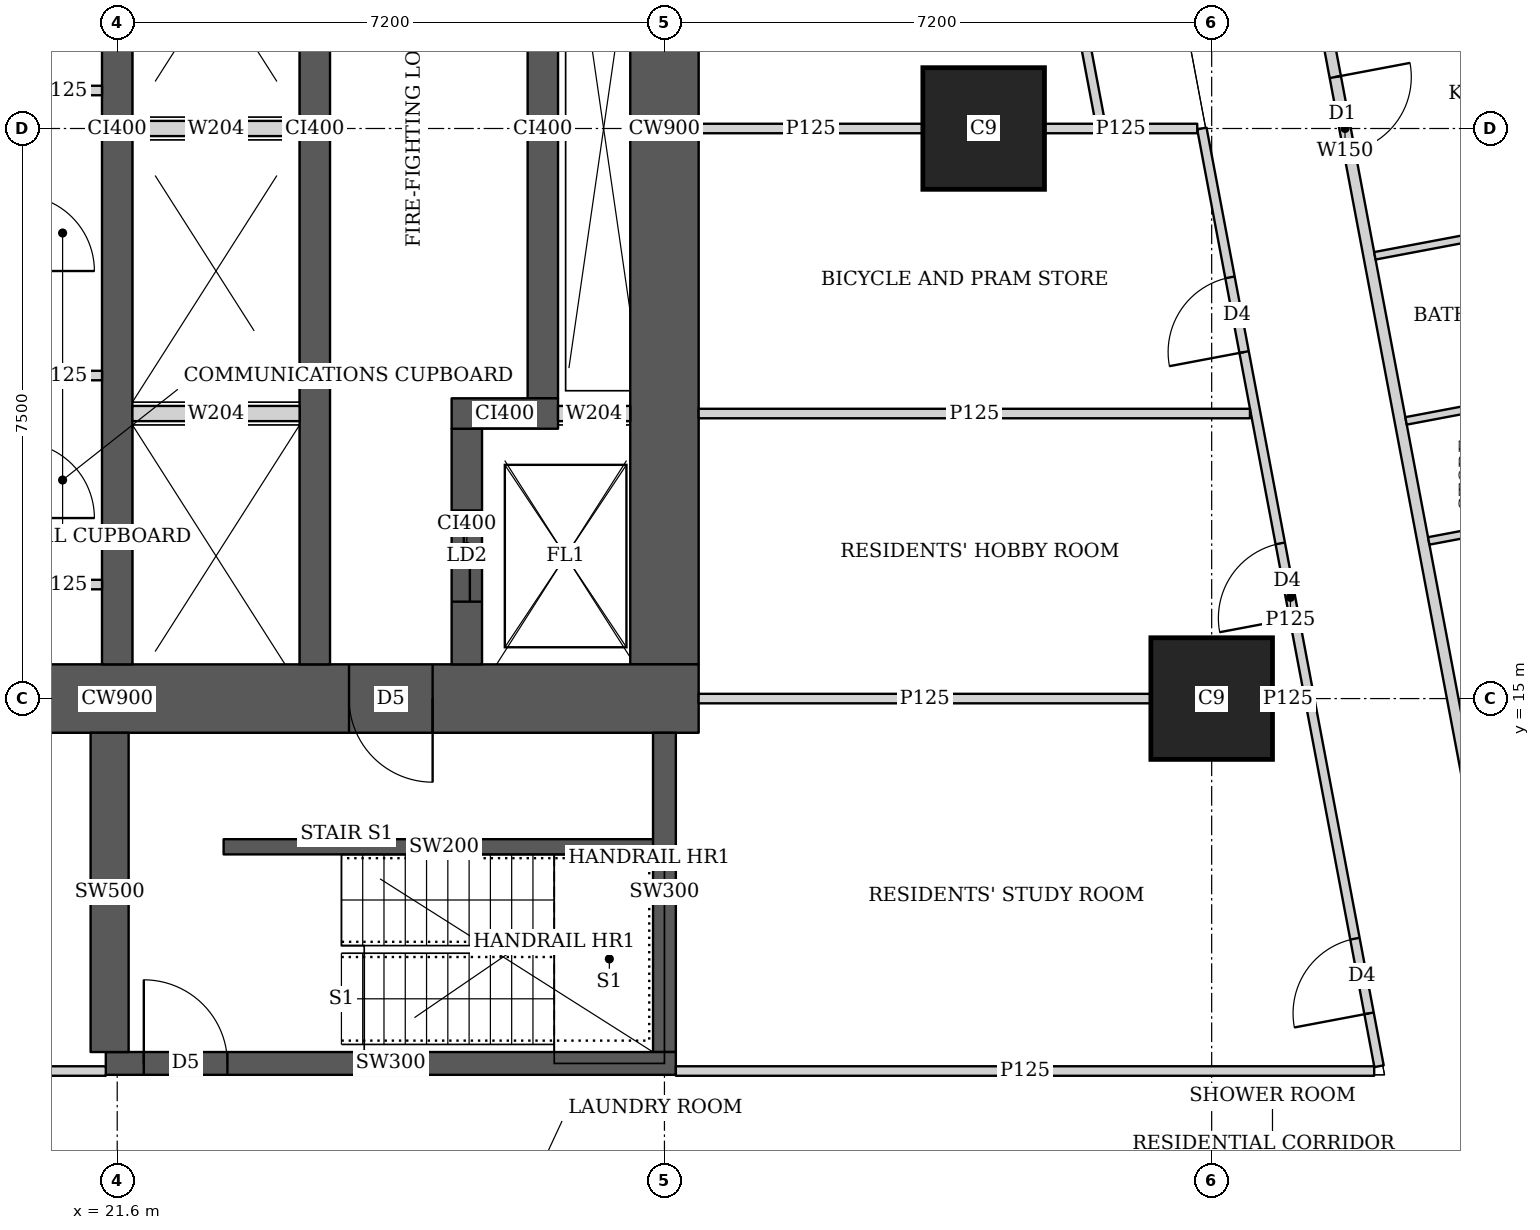
"""IFC4 building model, lengths in metres.
Left out: names, types, materials, properties, quantities, classifications, styles, units other than length and angle.
Written with IfcOpenShell. Run it as: python <this file> out.ifc"""

import sys

from ifc_helpers import new_model, si_unit, direction, frame, frame_2d, origin, origin_2d, place, context, subcontext, project, spatial, rectangle, extrude, element, fill, save


model = new_model("IFC4")
c1 = context("Model", 3, precision=1e-05, world=origin(), true_north=direction((0.0, 1.0)))
c2 = subcontext(c1, "Body", "Model", "MODEL_VIEW")
j1 = project(units=[si_unit("LENGTHUNIT", "METRE"), si_unit("PLANEANGLEUNIT", "RADIAN")], contexts=[c1])
p1 = place(None, origin())
s1 = spatial("IfcSite", under=j1, at=p1, CompositionType="ELEMENT")
p2 = place(p1, origin())
s2 = spatial("IfcBuilding", under=s1, at=p2, CompositionType="ELEMENT")
p3 = place(p2, frame((0.0, 0.0, 81.65)))
s3 = spatial("IfcBuildingStorey", under=s2, at=p3, CompositionType="ELEMENT", Elevation=81.65)
for number, where, z_axis, x_axis in (
    (1, (36.0, 15.0, 0.0), (0.0, 0.0, 1.0), (1.0, 0.0, 0.0)),
    (2, (33.0, 22.5, 0.0), (0.0, 0.0, 1.0), (1.0, 0.0, 0.0)),
):
    element("IfcColumn", number, at=place(p3, frame(where, z_axis=z_axis, x_axis=x_axis)), inside=s3, PredefinedType="COLUMN", context=c2, shape_type="SweptSolid", body=[
        extrude(rectangle(XDim=1.6, YDim=1.6, at=origin_2d()), origin(), (0.0, 0.0, 1.0), 3.75),
    ])
p4 = place(p3, frame((13.95, 15.0, 0.0), z_axis=(0.0, 0.0, 1.0), x_axis=(1.0, 0.0, 0.0)))
e3 = element("IfcWall", 3, at=p4, inside=s3, PredefinedType="SHEAR", context=c2, shape_type="SweptSolid", body=[
    extrude(rectangle(XDim=15.3, YDim=0.9, at=frame_2d((7.65, 0.0))), origin(), (0.0, 0.0, 1.0), 3.75),
])
p5 = place(p4, frame((4.45, 0.0, 0.0)))
e4 = element("IfcOpeningElement", 4, at=p5, cuts=e3, PredefinedType="OPENING", context=c2, shape_type="SweptSolid", body=[
    extrude(rectangle(XDim=1.8, YDim=2.1, at=frame_2d((0.9, 1.05))), frame((0.0, 0.46, 0.0), z_axis=(0.0, -1.0, 0.0), x_axis=(1.0, 0.0, 0.0)), (0.0, 0.0, 1.0), 0.92),
])
p6 = place(p4, frame((10.7, 0.0, 0.0)))
e5 = element("IfcOpeningElement", 5, at=p6, cuts=e3, PredefinedType="OPENING", context=c2, shape_type="SweptSolid", body=[
    extrude(rectangle(XDim=1.1, YDim=2.1, at=frame_2d((0.55, 1.05))), frame((0.0, 0.46, 0.0), z_axis=(0.0, -1.0, 0.0), x_axis=(1.0, 0.0, 0.0)), (0.0, 0.0, 1.0), 0.92),
])
p7 = place(p3, frame((28.8, 15.45, 0.0), z_axis=(0.0, 0.0, 1.0), x_axis=(0.0, 1.0, 0.0)))
e6 = element("IfcWall", 6, at=p7, inside=s3, PredefinedType="SHEAR", context=c2, shape_type="SweptSolid", body=[
    extrude(rectangle(XDim=14.1, YDim=0.9, at=frame_2d((7.05, 0.0))), origin(), (0.0, 0.0, 1.0), 3.75),
])
for number, where, z_axis, x_axis in (
    (7, (21.6, 15.45, 0.0), (0.0, 0.0, 1.0), (0.0, 1.0, 0.0)),
    (8, (24.2, 15.45, 0.0), (0.0, 0.0, 1.0), (0.0, 1.0, 0.0)),
):
    element("IfcWall", number, at=place(p3, frame(where, z_axis=z_axis, x_axis=x_axis)), inside=s3, PredefinedType="SHEAR", context=c2, shape_type="SweptSolid", body=[
        extrude(rectangle(XDim=14.1, YDim=0.4, at=frame_2d((7.05, 0.0))), origin(), (0.0, 0.0, 1.0), 3.75),
    ])
p8 = place(p3, frame((26.2, 15.45, 0.0), z_axis=(0.0, 0.0, 1.0), x_axis=(0.0, 1.0, 0.0)))
e9 = element("IfcWall", 9, at=p8, inside=s3, PredefinedType="SHEAR", context=c2, shape_type="SweptSolid", body=[
    extrude(rectangle(XDim=3.1, YDim=0.4, at=frame_2d((1.55, 0.0))), origin(), (0.0, 0.0, 1.0), 3.75),
])
p9 = place(p8, frame((0.825, 0.0, 0.0)))
e10 = element("IfcOpeningElement", 10, at=p9, cuts=e9, PredefinedType="OPENING", context=c2, shape_type="SweptSolid", body=[
    extrude(rectangle(XDim=1.2, YDim=2.1, at=frame_2d((0.6, 1.05))), frame((0.0, 0.21, 0.0), z_axis=(0.0, -1.0, 0.0), x_axis=(1.0, 0.0, 0.0)), (0.0, 0.0, 1.0), 0.42),
])
p10 = place(p3, frame((26.0, 18.75, 0.0), z_axis=(0.0, 0.0, 1.0), x_axis=(1.0, 0.0, 0.0)))
e11 = element("IfcWall", 11, at=p10, inside=s3, PredefinedType="SHEAR", context=c2, shape_type="SweptSolid", body=[
    extrude(rectangle(XDim=1.4, YDim=0.4, at=frame_2d((0.7, 0.0))), origin(), (0.0, 0.0, 1.0), 3.75),
])
p11 = place(p3, frame((27.2, 18.95, 0.0), z_axis=(0.0, 0.0, 1.0), x_axis=(0.0, 1.0, 0.0)))
e12 = element("IfcWall", 12, at=p11, inside=s3, PredefinedType="SHEAR", context=c2, shape_type="SweptSolid", body=[
    extrude(rectangle(XDim=7.1, YDim=0.4, at=frame_2d((3.55, 0.0))), origin(), (0.0, 0.0, 1.0), 3.75),
])
p12 = place(p3, frame((21.45, 10.2, 0.0), z_axis=(0.0, 0.0, 1.0), x_axis=(1.0, 0.0, 0.0)))
e13 = element("IfcWall", 13, at=p12, inside=s3, PredefinedType="SHEAR", context=c2, shape_type="SweptSolid", body=[
    extrude(rectangle(XDim=7.5, YDim=0.3, at=frame_2d((3.75, 0.0))), origin(), (0.0, 0.0, 1.0), 3.75),
])
p13 = place(p12, frame((0.5, 0.0, 0.0)))
e14 = element("IfcOpeningElement", 14, at=p13, cuts=e13, PredefinedType="OPENING", context=c2, shape_type="SweptSolid", body=[
    extrude(rectangle(XDim=1.1, YDim=2.1, at=frame_2d((0.55, 1.05))), frame((0.0, 0.16, 0.0), z_axis=(0.0, -1.0, 0.0), x_axis=(1.0, 0.0, 0.0)), (0.0, 0.0, 1.0), 0.32),
])
p14 = place(p3, frame((21.5, 10.35, 0.0), z_axis=(0.0, 0.0, 1.0), x_axis=(0.0, 1.0, 0.0)))
e15 = element("IfcWall", 15, at=p14, inside=s3, PredefinedType="SHEAR", context=c2, shape_type="SweptSolid", body=[
    extrude(rectangle(XDim=4.2, YDim=0.5, at=frame_2d((2.1, 0.0))), origin(), (0.0, 0.0, 1.0), 3.75),
])
p15 = place(p3, frame((28.8, 10.35, 0.0), z_axis=(0.0, 0.0, 1.0), x_axis=(0.0, 1.0, 0.0)))
e16 = element("IfcWall", 16, at=p15, inside=s3, PredefinedType="SHEAR", context=c2, shape_type="SweptSolid", body=[
    extrude(rectangle(XDim=4.2, YDim=0.3, at=frame_2d((2.1, 0.0))), origin(), (0.0, 0.0, 1.0), 3.75),
])
p16 = place(p3, frame((33.382, 45.65, 0.0), z_axis=(0.0, 0.0, 1.0), x_axis=(0.185593544777, -0.982626600565, 0.0)))
e17 = element("IfcWall", 17, at=p16, inside=s3, PredefinedType="SOLIDWALL", context=c2, shape_type="SweptSolid", body=[
    extrude(rectangle(XDim=47.118, YDim=0.15, at=frame_2d((23.559, 0.0))), origin(), (0.0, 0.0, 1.0), 2.2),
])
p17 = place(p16, frame((19.054, 0.0, 0.0)))
e18 = element("IfcOpeningElement", 18, at=p17, cuts=e17, PredefinedType="OPENING", context=c2, shape_type="SweptSolid", body=[
    extrude(rectangle(XDim=1.0, YDim=2.1, at=frame_2d((0.5, 1.05))), frame((0.0, 0.085, 0.0), z_axis=(0.0, -1.0, 0.0), x_axis=(1.0, 0.0, 0.0)), (0.0, 0.0, 1.0), 0.17),
])
p18 = place(p16, frame((22.87, 0.0, 0.0)))
e19 = element("IfcOpeningElement", 19, at=p18, cuts=e17, PredefinedType="OPENING", context=c2, shape_type="SweptSolid", body=[
    extrude(rectangle(XDim=1.0, YDim=2.1, at=frame_2d((0.5, 1.05))), frame((0.0, 0.085, 0.0), z_axis=(0.0, -1.0, 0.0), x_axis=(1.0, 0.0, 0.0)), (0.0, 0.0, 1.0), 0.17),
])
p19 = place(p16, frame((33.833, 0.0, 0.0)))
e20 = element("IfcOpeningElement", 20, at=p19, cuts=e17, PredefinedType="OPENING", context=c2, shape_type="SweptSolid", body=[
    extrude(rectangle(XDim=1.0, YDim=2.1, at=frame_2d((0.5, 1.05))), frame((0.0, 0.085, 0.0), z_axis=(0.0, -1.0, 0.0), x_axis=(1.0, 0.0, 0.0)), (0.0, 0.0, 1.0), 0.17),
])
p20 = place(p3, frame((41.365, 21.433, 0.0), z_axis=(0.0, 0.0, 1.0), x_axis=(-0.982607026909, -0.185697147715, 0.0)))
e21 = element("IfcWall", 21, at=p20, inside=s3, PredefinedType="PARTITIONING", context=c2, shape_type="SweptSolid", body=[
    extrude(rectangle(XDim=3.275, YDim=0.1, at=frame_2d((1.637, 0.0))), origin(), (0.0, 0.0, 1.0), 3.5),
])
p21 = place(p3, frame((42.073, 17.682, 0.0), z_axis=(0.0, 0.0, 1.0), x_axis=(-0.982610347627, -0.185679575441, 0.0)))
e22 = element("IfcWall", 22, at=p21, inside=s3, PredefinedType="PARTITIONING", context=c2, shape_type="SweptSolid", body=[
    extrude(rectangle(XDim=3.274, YDim=0.1, at=frame_2d((1.637, 0.0))), origin(), (0.0, 0.0, 1.0), 3.5),
])
p22 = place(p21, frame((1.2, 0.0, 0.0)))
e23 = element("IfcOpeningElement", 23, at=p22, cuts=e22, PredefinedType="OPENING", context=c2, shape_type="SweptSolid", body=[
    extrude(rectangle(XDim=0.9, YDim=2.1, at=frame_2d((0.45, 1.05))), frame((0.0, 0.06, 0.0), z_axis=(0.0, -1.0, 0.0), x_axis=(1.0, 0.0, 0.0)), (0.0, 0.0, 1.0), 0.12),
])
p23 = place(p3, frame((41.775, 19.261, 0.0), z_axis=(0.0, 0.0, 1.0), x_axis=(-0.982620626894, -0.185625169636, 0.0)))
e24 = element("IfcWall", 24, at=p23, inside=s3, PredefinedType="PARTITIONING", context=c2, shape_type="SweptSolid", body=[
    extrude(rectangle(XDim=3.275, YDim=0.1, at=frame_2d((1.637, 0.0))), origin(), (0.0, 0.0, 1.0), 3.5),
])
p24 = place(p3, frame((10.163, 10.1, 0.0), z_axis=(0.0, 0.0, 1.0), x_axis=(1.0, 0.0, 0.0)))
e25 = element("IfcWall", 25, at=p24, inside=s3, PredefinedType="PARTITIONING", context=c2, shape_type="SweptSolid", body=[
    extrude(rectangle(XDim=11.287, YDim=0.125, at=frame_2d((5.644, 0.0))), origin(), (0.0, 0.0, 1.0), 3.5),
])
p25 = place(p24, frame((7.832, 0.0, 0.0)))
e26 = element("IfcOpeningElement", 26, at=p25, cuts=e25, PredefinedType="OPENING", context=c2, shape_type="SweptSolid", body=[
    extrude(rectangle(XDim=1.8, YDim=2.1, at=frame_2d((0.9, 1.05))), frame((0.0, 0.073, 0.0), z_axis=(0.0, -1.0, 0.0), x_axis=(1.0, 0.0, 0.0)), (0.0, 0.0, 1.0), 0.145),
])
p26 = place(p3, frame((28.95, 10.1, 0.0), z_axis=(0.0, 0.0, 1.0), x_axis=(1.0, 0.0, 0.0)))
e27 = element("IfcWall", 27, at=p26, inside=s3, PredefinedType="PARTITIONING", context=c2, shape_type="SweptSolid", body=[
    extrude(rectangle(XDim=9.188, YDim=0.125, at=frame_2d((4.594, 0.0))), origin(), (0.0, 0.0, 1.0), 3.5),
])
p27 = place(p3, frame((38.202, 10.163, 0.0), z_axis=(0.0, 0.0, 1.0), x_axis=(-0.185645577403, 0.982616771479, 0.0)))
e28 = element("IfcWall", 28, at=p27, inside=s3, PredefinedType="PARTITIONING", context=c2, shape_type="SweptSolid", body=[
    extrude(rectangle(XDim=12.555, YDim=0.125, at=frame_2d((6.278, 0.0))), origin(), (0.0, 0.0, 1.0), 2.5),
])
p28 = place(p27, frame((0.708, 0.0, 0.0)))
e29 = element("IfcOpeningElement", 29, at=p28, cuts=e28, PredefinedType="OPENING", context=c2, shape_type="SweptSolid", body=[
    extrude(rectangle(XDim=1.0, YDim=2.1, at=frame_2d((0.5, 1.05))), frame((0.0, 0.073, 0.0), z_axis=(0.0, -1.0, 0.0), x_axis=(1.0, 0.0, 0.0)), (0.0, 0.0, 1.0), 0.145),
])
p29 = place(p27, frame((6.0, 0.0, 0.0)))
e30 = element("IfcOpeningElement", 30, at=p29, cuts=e28, PredefinedType="OPENING", context=c2, shape_type="SweptSolid", body=[
    extrude(rectangle(XDim=1.0, YDim=2.1, at=frame_2d((0.5, 1.05))), frame((0.0, 0.073, 0.0), z_axis=(0.0, -1.0, 0.0), x_axis=(1.0, 0.0, 0.0)), (0.0, 0.0, 1.0), 0.145),
])
p30 = place(p27, frame((9.562, 0.0, 0.0)))
e31 = element("IfcOpeningElement", 31, at=p30, cuts=e28, PredefinedType="OPENING", context=c2, shape_type="SweptSolid", body=[
    extrude(rectangle(XDim=1.0, YDim=2.1, at=frame_2d((0.5, 1.05))), frame((0.0, 0.073, 0.0), z_axis=(0.0, -1.0, 0.0), x_axis=(1.0, 0.0, 0.0)), (0.0, 0.0, 1.0), 0.145),
])
p31 = place(p3, frame((34.535, 22.574, 0.0), z_axis=(0.0, 0.0, 1.0), x_axis=(-0.185591596381, 0.982626968566, 0.0)))
e32 = element("IfcWall", 32, at=p31, inside=s3, PredefinedType="PARTITIONING", context=c2, shape_type="SweptSolid", body=[
    extrude(rectangle(XDim=6.73, YDim=0.125, at=frame_2d((3.365, 0.0))), origin(), (0.0, 0.0, 1.0), 2.5),
])
p32 = place(p31, frame((3.241, 0.0, 0.0)))
e33 = element("IfcOpeningElement", 33, at=p32, cuts=e32, PredefinedType="OPENING", context=c2, shape_type="SweptSolid", body=[
    extrude(rectangle(XDim=1.0, YDim=2.1, at=frame_2d((0.5, 1.05))), frame((0.0, 0.073, 0.0), z_axis=(0.0, -1.0, 0.0), x_axis=(1.0, 0.0, 0.0)), (0.0, 0.0, 1.0), 0.145),
])
p33 = place(p3, frame((29.25, 15.0, 0.0), z_axis=(0.0, 0.0, 1.0), x_axis=(1.0, 0.0, 0.0)))
e34 = element("IfcWall", 34, at=p33, inside=s3, PredefinedType="PARTITIONING", context=c2, shape_type="SweptSolid", body=[
    extrude(rectangle(XDim=5.949, YDim=0.125, at=frame_2d((2.975, 0.0))), origin(), (0.0, 0.0, 1.0), 3.5),
])
p34 = place(p3, frame((36.801, 15.0, 0.0), z_axis=(0.0, 0.0, 1.0), x_axis=(1.0, 0.0, 0.0)))
e35 = element("IfcWall", 35, at=p34, inside=s3, PredefinedType="PARTITIONING", context=c2, shape_type="SweptSolid", body=[
    extrude(rectangle(XDim=0.412, YDim=0.125, at=frame_2d((0.206, 0.0))), origin(), (0.0, 0.0, 1.0), 3.5),
])
p35 = place(p3, frame((29.25, 18.75, 0.0), z_axis=(0.0, 0.0, 1.0), x_axis=(1.0, 0.0, 0.0)))
e36 = element("IfcWall", 36, at=p35, inside=s3, PredefinedType="PARTITIONING", context=c2, shape_type="SweptSolid", body=[
    extrude(rectangle(XDim=7.254, YDim=0.125, at=frame_2d((3.627, 0.0))), origin(), (0.0, 0.0, 1.0), 3.5),
])
p36 = place(p3, frame((29.25, 22.5, 0.0), z_axis=(0.0, 0.0, 1.0), x_axis=(1.0, 0.0, 0.0)))
e37 = element("IfcWall", 37, at=p36, inside=s3, PredefinedType="PARTITIONING", context=c2, shape_type="SweptSolid", body=[
    extrude(rectangle(XDim=2.949, YDim=0.125, at=frame_2d((1.475, 0.0))), origin(), (0.0, 0.0, 1.0), 3.5),
])
p37 = place(p3, frame((33.801, 22.5, 0.0), z_axis=(0.0, 0.0, 1.0), x_axis=(1.0, 0.0, 0.0)))
e38 = element("IfcWall", 38, at=p37, inside=s3, PredefinedType="PARTITIONING", context=c2, shape_type="SweptSolid", body=[
    extrude(rectangle(XDim=2.009, YDim=0.125, at=frame_2d((1.004, 0.0))), origin(), (0.0, 0.0, 1.0), 2.5),
])
for number, where, z_axis, x_axis in (
    (39, (20.363, 16.5, 0.0), (0.0, 0.0, 1.0), (1.0, 0.0, 0.0)),
    (40, (20.363, 19.25, 0.0), (0.0, 0.0, 1.0), (1.0, 0.0, 0.0)),
    (41, (20.363, 23.0, 0.0), (0.0, 0.0, 1.0), (1.0, 0.0, 0.0)),
):
    element("IfcWall", number, at=place(p3, frame(where, z_axis=z_axis, x_axis=x_axis)), inside=s3, PredefinedType="PARTITIONING", context=c2, shape_type="SweptSolid", body=[
        extrude(rectangle(XDim=1.037, YDim=0.125, at=frame_2d((0.519, 0.0))), origin(), (0.0, 0.0, 1.0), 3.5),
    ])
p38 = place(p3, frame((23.0, 13.05, 0.0), z_axis=(0.0, 0.0, 1.0), x_axis=(1.0, 0.0, 0.0)))
e42 = element("IfcWall", 42, at=p38, inside=s3, PredefinedType="SHEAR", context=c2, shape_type="SweptSolid", body=[
    extrude(rectangle(XDim=5.8, YDim=0.2, at=frame_2d((2.9, 0.0))), origin(), (0.0, 0.0, 1.0), 3.75),
])
for number, where, z_axis, x_axis in (
    (43, (21.8, 18.75, 0.0), (0.0, 0.0, 1.0), (1.0, 0.0, 0.0)),
    (44, (21.8, 22.5, 0.0), (0.0, 0.0, 1.0), (1.0, 0.0, 0.0)),
):
    element("IfcWall", number, at=place(p3, frame(where, z_axis=z_axis, x_axis=x_axis)), inside=s3, PredefinedType="SOLIDWALL", context=c2, shape_type="SweptSolid", body=[
        extrude(rectangle(XDim=2.2, YDim=0.2, at=frame_2d((1.1, 0.0))), origin(), (0.0, 0.0, 1.0), 3.5),
    ])
p39 = place(p3, frame((27.4, 18.75, 0.0), z_axis=(0.0, 0.0, 1.0), x_axis=(1.0, 0.0, 0.0)))
e45 = element("IfcWall", 45, at=p39, inside=s3, PredefinedType="SOLIDWALL", context=c2, shape_type="SweptSolid", body=[
    extrude(rectangle(XDim=0.95, YDim=0.2, at=frame_2d((0.475, 0.0))), origin(), (0.0, 0.0, 1.0), 3.5),
])
p40 = place(p18, origin())
e46 = element("IfcDoor", 46, at=p40, inside=s3, OperationType="SINGLE_SWING_LEFT", PredefinedType="DOOR", context=c2, shape_type="SweptSolid", body=[
    extrude(rectangle(XDim=1.0, YDim=2.1, at=frame_2d((0.5, 1.05))), frame((0.0, 0.025, 0.0), z_axis=(0.0, -1.0, 0.0), x_axis=(1.0, 0.0, 0.0)), (0.0, 0.0, 1.0), 0.05),
])
fill(e19, e46)
p41 = place(p28, origin())
e47 = element("IfcDoor", 47, at=p41, inside=s3, OperationType="SINGLE_SWING_LEFT", PredefinedType="DOOR", context=c2, shape_type="SweptSolid", body=[
    extrude(rectangle(XDim=1.0, YDim=2.1, at=frame_2d((0.5, 1.05))), frame((0.0, 0.025, 0.0), z_axis=(0.0, -1.0, 0.0), x_axis=(1.0, 0.0, 0.0)), (0.0, 0.0, 1.0), 0.05),
])
fill(e29, e47)
p42 = place(p29, origin())
e48 = element("IfcDoor", 48, at=p42, inside=s3, OperationType="SINGLE_SWING_LEFT", PredefinedType="DOOR", context=c2, shape_type="SweptSolid", body=[
    extrude(rectangle(XDim=1.0, YDim=2.1, at=frame_2d((0.5, 1.05))), frame((0.0, 0.025, 0.0), z_axis=(0.0, -1.0, 0.0), x_axis=(1.0, 0.0, 0.0)), (0.0, 0.0, 1.0), 0.05),
])
fill(e30, e48)
p43 = place(p30, origin())
e49 = element("IfcDoor", 49, at=p43, inside=s3, OperationType="SINGLE_SWING_LEFT", PredefinedType="DOOR", context=c2, shape_type="SweptSolid", body=[
    extrude(rectangle(XDim=1.0, YDim=2.1, at=frame_2d((0.5, 1.05))), frame((0.0, 0.025, 0.0), z_axis=(0.0, -1.0, 0.0), x_axis=(1.0, 0.0, 0.0)), (0.0, 0.0, 1.0), 0.05),
])
fill(e31, e49)
p44 = place(p6, origin())
e50 = element("IfcDoor", 50, at=p44, inside=s3, OperationType="SINGLE_SWING_LEFT", PredefinedType="DOOR", context=c2, shape_type="SweptSolid", body=[
    extrude(rectangle(XDim=1.1, YDim=2.1, at=frame_2d((0.55, 1.05))), frame((0.0, 0.025, 0.0), z_axis=(0.0, -1.0, 0.0), x_axis=(1.0, 0.0, 0.0)), (0.0, 0.0, 1.0), 0.05),
])
fill(e5, e50)
p45 = place(p9, origin())
e51 = element("IfcDoor", 51, at=p45, inside=s3, OperationType="DOUBLE_DOOR_SLIDING", PredefinedType="DOOR", context=c2, shape_type="SweptSolid", body=[
    extrude(rectangle(XDim=1.2, YDim=2.1, at=frame_2d((0.6, 1.05))), frame((0.0, 0.025, 0.0), z_axis=(0.0, -1.0, 0.0), x_axis=(1.0, 0.0, 0.0)), (0.0, 0.0, 1.0), 0.05),
])
fill(e10, e51)
p46 = place(p13, origin())
e52 = element("IfcDoor", 52, at=p46, inside=s3, OperationType="SINGLE_SWING_LEFT", PredefinedType="DOOR", context=c2, shape_type="SweptSolid", body=[
    extrude(rectangle(XDim=1.1, YDim=2.1, at=frame_2d((0.55, 1.05))), frame((0.0, 0.025, 0.0), z_axis=(0.0, -1.0, 0.0), x_axis=(1.0, 0.0, 0.0)), (0.0, 0.0, 1.0), 0.05),
])
fill(e14, e52)
save(model, sys.argv[1])
